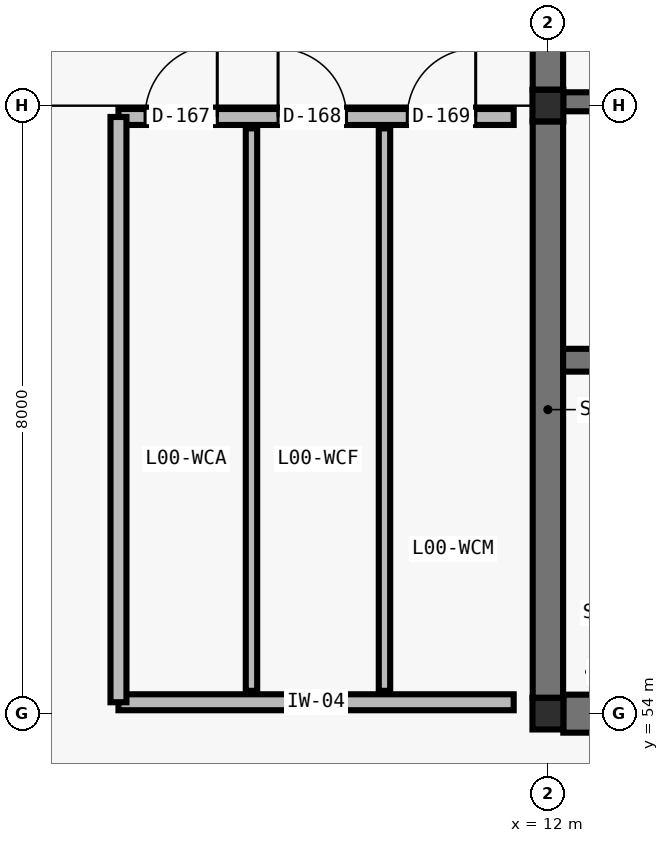
"""IFC4 building model, lengths in metres.
Left out: names, types, materials, properties, quantities, classifications, styles, units other than length and angle.
Written with IfcOpenShell. Run it as: python <this file> out.ifc"""

import sys

from ifc_helpers import new_model, si_unit, direction, frame, frame_2d, origin, origin_2d, place, context, subcontext, project, spatial, rectangle, i_section, extrude, element, fill, save


model = new_model("IFC4")
c1 = context("Model", 3, precision=1e-05, world=origin(), true_north=direction((0.0, 1.0)))
c2 = subcontext(c1, "Body", "Model", "MODEL_VIEW")
j1 = project(units=[si_unit("LENGTHUNIT", "METRE"), si_unit("PLANEANGLEUNIT", "RADIAN")], contexts=[c1])
p1 = place(None, origin())
s1 = spatial("IfcSite", under=j1, at=p1, CompositionType="ELEMENT")
p2 = place(p1, origin())
s2 = spatial("IfcBuilding", under=s1, at=p2, CompositionType="ELEMENT")
p3 = place(p2, origin())
s3 = spatial("IfcBuildingStorey", under=s2, at=p3, CompositionType="ELEMENT", Elevation=0.0)
for number, where, z_axis, x_axis in (
    (1, (12.0, 54.0, 0.0), (0.0, 0.0, 1.0), (1.0, 0.0, 0.0)),
    (2, (12.0, 62.0, 0.0), (0.0, 0.0, 1.0), (1.0, 0.0, 0.0)),
):
    element("IfcColumn", number, at=place(p3, frame(where, z_axis=z_axis, x_axis=x_axis)), inside=s3, PredefinedType="COLUMN", context=c2, shape_type="SweptSolid", body=[
        extrude(i_section(OverallWidth=0.406, OverallDepth=0.416, WebThickness=0.03, FlangeThickness=0.048, at=origin_2d()), origin(), (0.0, 0.0, 1.0), 6.02),
    ])
p4 = place(p3, frame((12.203, 54.0, 0.0), z_axis=(0.0, 0.0, 1.0), x_axis=(1.0, 0.0, 0.0)))
e3 = element("IfcWall", 3, at=p4, inside=s3, PredefinedType="SHEAR", context=c2, shape_type="SweptSolid", body=[
    extrude(rectangle(XDim=7.797, YDim=0.5, at=frame_2d((3.898, 0.0))), origin(), (0.0, 0.0, 1.0), 6.02),
])
p5 = place(p3, frame((12.0, 54.208, 0.0), z_axis=(0.0, 0.0, 1.0), x_axis=(0.0, 1.0, 0.0)))
e4 = element("IfcWall", 4, at=p5, inside=s3, PredefinedType="SHEAR", context=c2, shape_type="SweptSolid", body=[
    extrude(rectangle(XDim=7.584, YDim=0.4, at=frame_2d((3.792, 0.0))), origin(), (0.0, 0.0, 1.0), 6.02),
])
p6 = place(p3, frame((12.0, 62.208, 0.0), z_axis=(0.0, 0.0, 1.0), x_axis=(0.0, 1.0, 0.0)))
e5 = element("IfcWall", 5, at=p6, inside=s3, PredefinedType="SHEAR", context=c2, shape_type="SweptSolid", body=[
    extrude(rectangle(XDim=7.584, YDim=0.4, at=frame_2d((3.792, 0.0))), origin(), (0.0, 0.0, 1.0), 6.02),
])
p7 = place(p6, frame((0.692, 0.0, 0.0)))
e6 = element("IfcOpeningElement", 6, at=p7, cuts=e5, PredefinedType="OPENING", context=c2, shape_type="SweptSolid", body=[
    extrude(rectangle(XDim=1.8, YDim=2.2, at=frame_2d((0.9, 1.1))), frame((0.0, 0.21, 0.0), z_axis=(0.0, -1.0, 0.0), x_axis=(1.0, 0.0, 0.0)), (0.0, 0.0, 1.0), 0.42),
])
p8 = place(p3, frame((12.2, 58.65, 0.0), z_axis=(0.0, 0.0, 1.0), x_axis=(1.0, 0.0, 0.0)))
e7 = element("IfcWall", 7, at=p8, inside=s3, PredefinedType="SHEAR", context=c2, shape_type="SweptSolid", body=[
    extrude(rectangle(XDim=9.75, YDim=0.3, at=frame_2d((4.875, 0.0))), origin(), (0.0, 0.0, 1.0), 6.02),
])
p9 = place(p8, frame((0.55, 0.0, 0.0)))
e8 = element("IfcOpeningElement", 8, at=p9, cuts=e7, PredefinedType="OPENING", context=c2, shape_type="SweptSolid", body=[
    extrude(rectangle(XDim=1.2, YDim=2.2, at=frame_2d((0.6, 1.1))), frame((0.0, 0.16, 0.0), z_axis=(0.0, -1.0, 0.0), x_axis=(1.0, 0.0, 0.0)), (0.0, 0.0, 1.0), 0.32),
])
p10 = place(p3, frame((12.2, 62.05, 0.0), z_axis=(0.0, 0.0, 1.0), x_axis=(1.0, 0.0, 0.0)))
e9 = element("IfcWall", 9, at=p10, inside=s3, PredefinedType="SHEAR", context=c2, shape_type="SweptSolid", body=[
    extrude(rectangle(XDim=16.55, YDim=0.25, at=frame_2d((8.275, 0.0))), origin(), (0.0, 0.0, 1.0), 6.02),
])
p11 = place(p10, frame((2.6, 0.0, 0.0)))
e10 = element("IfcOpeningElement", 10, at=p11, cuts=e9, PredefinedType="OPENING", context=c2, shape_type="SweptSolid", body=[
    extrude(rectangle(XDim=1.12, YDim=2.22, at=frame_2d((0.56, 1.11))), frame((0.0, 0.135, 0.0), z_axis=(0.0, -1.0, 0.0), x_axis=(1.0, 0.0, 0.0)), (0.0, 0.0, 1.0), 0.27),
])
p12 = place(p10, frame((11.2, 0.0, 0.0)))
e11 = element("IfcOpeningElement", 11, at=p12, cuts=e9, PredefinedType="OPENING", context=c2, shape_type="SweptSolid", body=[
    extrude(rectangle(XDim=1.12, YDim=2.22, at=frame_2d((0.56, 1.11))), frame((0.0, 0.135, 0.0), z_axis=(0.0, -1.0, 0.0), x_axis=(1.0, 0.0, 0.0)), (0.0, 0.0, 1.0), 0.27),
])
p13 = place(p3, frame((6.35, 61.85, 0.0), z_axis=(0.0, 0.0, 1.0), x_axis=(1.0, 0.0, 0.0)))
e12 = element("IfcWall", 12, at=p13, inside=s3, PredefinedType="PLUMBINGWALL", context=c2, shape_type="SweptSolid", body=[
    extrude(rectangle(XDim=5.2, YDim=0.21, at=frame_2d((2.6, 0.0))), origin(), (0.0, 0.0, 1.0), 4.92),
])
p14 = place(p13, frame((0.35, 0.0, 0.0)))
e13 = element("IfcOpeningElement", 13, at=p14, cuts=e12, PredefinedType="OPENING", context=c2, shape_type="SweptSolid", body=[
    extrude(rectangle(XDim=0.95, YDim=2.1, at=frame_2d((0.475, 1.05))), frame((0.0, 0.115, 0.0), z_axis=(0.0, -1.0, 0.0), x_axis=(1.0, 0.0, 0.0)), (0.0, 0.0, 1.0), 0.23),
])
p15 = place(p13, frame((2.1, 0.0, 0.0)))
e14 = element("IfcOpeningElement", 14, at=p15, cuts=e12, PredefinedType="OPENING", context=c2, shape_type="SweptSolid", body=[
    extrude(rectangle(XDim=0.9, YDim=2.1, at=frame_2d((0.45, 1.05))), frame((0.0, 0.115, 0.0), z_axis=(0.0, -1.0, 0.0), x_axis=(1.0, 0.0, 0.0)), (0.0, 0.0, 1.0), 0.23),
])
p16 = place(p13, frame((3.8, 0.0, 0.0)))
e15 = element("IfcOpeningElement", 15, at=p16, cuts=e12, PredefinedType="OPENING", context=c2, shape_type="SweptSolid", body=[
    extrude(rectangle(XDim=0.9, YDim=2.1, at=frame_2d((0.45, 1.05))), frame((0.0, 0.115, 0.0), z_axis=(0.0, -1.0, 0.0), x_axis=(1.0, 0.0, 0.0)), (0.0, 0.0, 1.0), 0.23),
])
p17 = place(p3, frame((6.35, 54.15, 0.0), z_axis=(0.0, 0.0, 1.0), x_axis=(1.0, 0.0, 0.0)))
e16 = element("IfcWall", 16, at=p17, inside=s3, PredefinedType="PLUMBINGWALL", context=c2, shape_type="SweptSolid", body=[
    extrude(rectangle(XDim=5.2, YDim=0.21, at=frame_2d((2.6, 0.0))), origin(), (0.0, 0.0, 1.0), 4.92),
])
p18 = place(p3, frame((6.35, 54.15, 0.0), z_axis=(0.0, 0.0, 1.0), x_axis=(0.0, 1.0, 0.0)))
e17 = element("IfcWall", 17, at=p18, inside=s3, PredefinedType="PLUMBINGWALL", context=c2, shape_type="SweptSolid", body=[
    extrude(rectangle(XDim=7.7, YDim=0.21, at=frame_2d((3.85, 0.0))), origin(), (0.0, 0.0, 1.0), 6.02),
])
for number, where, z_axis, x_axis in (
    (18, (8.1, 54.3, 0.0), (0.0, 0.0, 1.0), (0.0, 1.0, 0.0)),
    (19, (9.85, 54.3, 0.0), (0.0, 0.0, 1.0), (0.0, 1.0, 0.0)),
):
    element("IfcWall", number, at=place(p3, frame(where, z_axis=z_axis, x_axis=x_axis)), inside=s3, PredefinedType="PARTITIONING", context=c2, shape_type="SweptSolid", body=[
        extrude(rectangle(XDim=7.4, YDim=0.15, at=frame_2d((3.7, 0.0))), origin(), (0.0, 0.0, 1.0), 6.02),
    ])
p19 = place(p14, origin())
e20 = element("IfcDoor", 20, at=p19, inside=s3, OperationType="SINGLE_SWING_RIGHT", PredefinedType="DOOR", context=c2, shape_type="SweptSolid", body=[
    extrude(rectangle(XDim=0.95, YDim=2.1, at=frame_2d((0.475, 1.05))), frame((0.0, 0.025, 0.0), z_axis=(0.0, -1.0, 0.0), x_axis=(1.0, 0.0, 0.0)), (0.0, 0.0, 1.0), 0.05),
])
fill(e13, e20)
p20 = place(p15, origin())
e21 = element("IfcDoor", 21, at=p20, inside=s3, OperationType="SINGLE_SWING_LEFT", PredefinedType="DOOR", context=c2, shape_type="SweptSolid", body=[
    extrude(rectangle(XDim=0.9, YDim=2.1, at=frame_2d((0.45, 1.05))), frame((0.0, 0.025, 0.0), z_axis=(0.0, -1.0, 0.0), x_axis=(1.0, 0.0, 0.0)), (0.0, 0.0, 1.0), 0.05),
])
fill(e14, e21)
p21 = place(p16, origin())
e22 = element("IfcDoor", 22, at=p21, inside=s3, OperationType="SINGLE_SWING_RIGHT", PredefinedType="DOOR", context=c2, shape_type="SweptSolid", body=[
    extrude(rectangle(XDim=0.9, YDim=2.1, at=frame_2d((0.45, 1.05))), frame((0.0, 0.025, 0.0), z_axis=(0.0, -1.0, 0.0), x_axis=(1.0, 0.0, 0.0)), (0.0, 0.0, 1.0), 0.05),
])
fill(e15, e22)
save(model, sys.argv[1])
